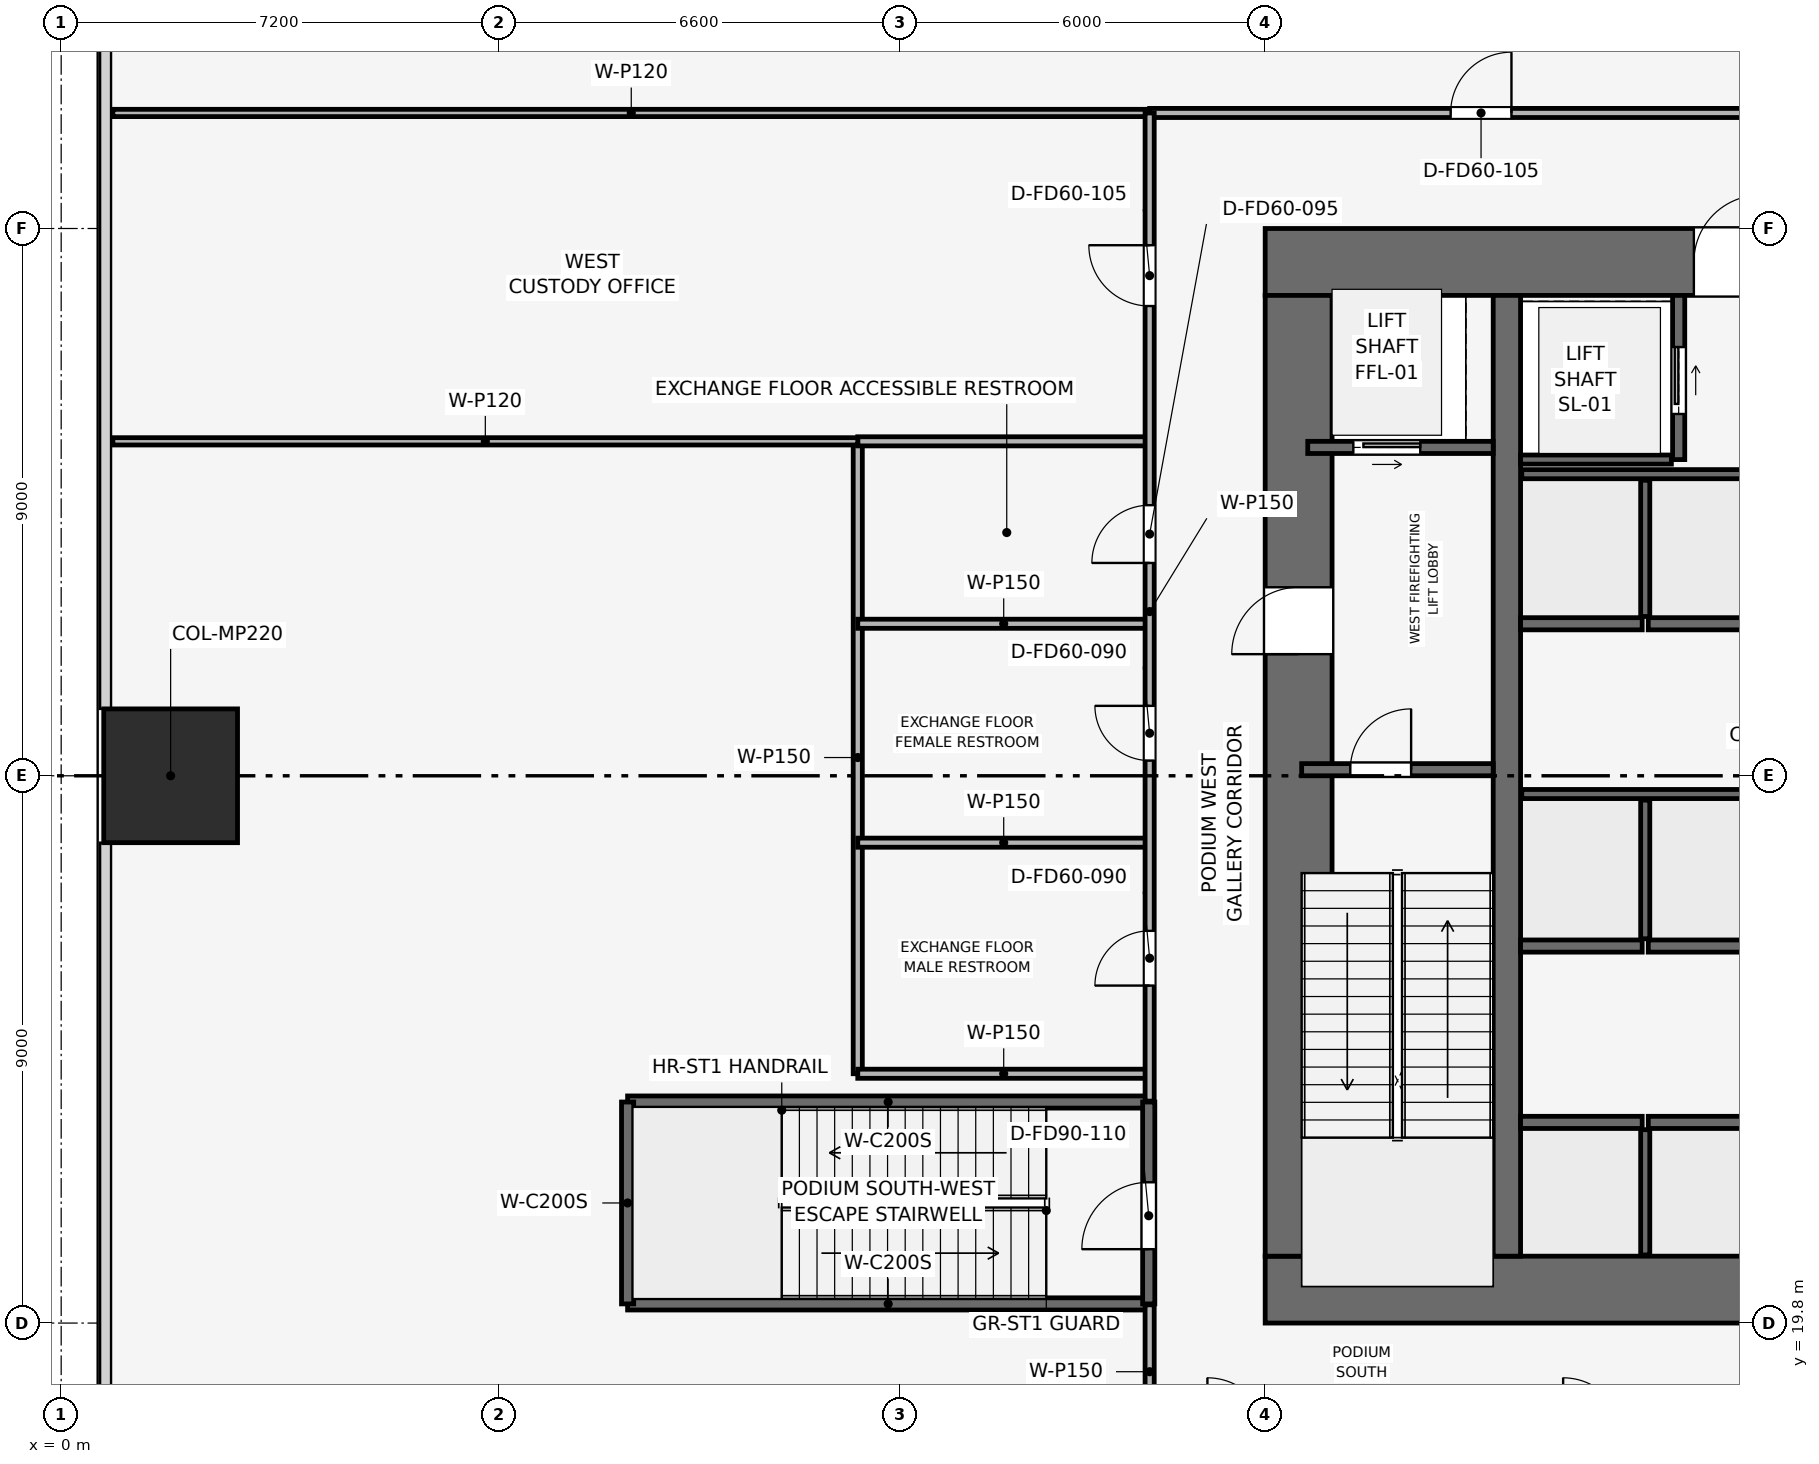
"""IFC4 building model, lengths in metres.
Left out: names, types, materials, properties, quantities, classifications, styles, units other than length and angle.
Written with IfcOpenShell. Run it as: python <this file> out.ifc"""

import sys

from ifc_helpers import new_model, si_unit, direction, frame, frame_2d, origin, origin_2d, place, context, subcontext, project, spatial, rectangle, extrude, element, fill, save


model = new_model("IFC4")
c1 = context("Model", 3, precision=1e-05, world=origin(), true_north=direction((0.0, 1.0)))
c2 = subcontext(c1, "Body", "Model", "MODEL_VIEW")
j1 = project(units=[si_unit("LENGTHUNIT", "METRE"), si_unit("PLANEANGLEUNIT", "RADIAN")], contexts=[c1])
p1 = place(None, origin())
s1 = spatial("IfcSite", under=j1, at=p1, CompositionType="ELEMENT")
p2 = place(p1, origin())
s2 = spatial("IfcBuilding", under=s1, at=p2, CompositionType="ELEMENT")
p3 = place(p2, frame((0.0, 0.0, 13.8)))
s3 = spatial("IfcBuildingStorey", under=s2, at=p3, CompositionType="ELEMENT", Elevation=13.8)
p4 = place(p3, frame((19.8, 20.35, 0.0), z_axis=(0.0, 0.0, 1.0), x_axis=(1.0, 0.0, 0.0)))
e1 = element("IfcWall", 1, at=p4, inside=s3, PredefinedType="SHEAR", context=c2, shape_type="SweptSolid", body=[
    extrude(rectangle(XDim=18.0, YDim=1.1, at=frame_2d((9.0, 0.0))), origin(), (0.0, 0.0, 1.0), 5.4),
])
p5 = place(p4, frame((8.4, 0.0, 0.0)))
e2 = element("IfcOpeningElement", 2, at=p5, cuts=e1, PredefinedType="OPENING", context=c2, shape_type="SweptSolid", body=[
    extrude(rectangle(XDim=1.2, YDim=2.2, at=frame_2d((0.6, 1.1))), frame((0.0, 0.56, 0.0), z_axis=(0.0, -1.0, 0.0), x_axis=(1.0, 0.0, 0.0)), (0.0, 0.0, 1.0), 1.12),
])
p6 = place(p3, frame((19.8, 37.25, 0.0), z_axis=(0.0, 0.0, 1.0), x_axis=(1.0, 0.0, 0.0)))
e3 = element("IfcWall", 3, at=p6, inside=s3, PredefinedType="SHEAR", context=c2, shape_type="SweptSolid", body=[
    extrude(rectangle(XDim=18.0, YDim=1.1, at=frame_2d((9.0, 0.0))), origin(), (0.0, 0.0, 1.0), 5.4),
])
p7 = place(p6, frame((7.05, 0.0, 0.0)))
e4 = element("IfcOpeningElement", 4, at=p7, cuts=e3, PredefinedType="OPENING", context=c2, shape_type="SweptSolid", body=[
    extrude(rectangle(XDim=1.1, YDim=2.15, at=frame_2d((0.55, 1.075))), frame((0.0, 0.56, 0.0), z_axis=(0.0, -1.0, 0.0), x_axis=(1.0, 0.0, 0.0)), (0.0, 0.0, 1.0), 1.12),
])
p8 = place(p3, frame((20.35, 20.9, 0.0), z_axis=(0.0, 0.0, 1.0), x_axis=(0.0, 1.0, 0.0)))
e5 = element("IfcWall", 5, at=p8, inside=s3, PredefinedType="SHEAR", context=c2, shape_type="SweptSolid", body=[
    extrude(rectangle(XDim=15.8, YDim=1.1, at=frame_2d((7.9, 0.0))), origin(), (0.0, 0.0, 1.0), 5.4),
])
p9 = place(p8, frame((9.9, 0.0, 0.0)))
e6 = element("IfcOpeningElement", 6, at=p9, cuts=e5, PredefinedType="OPENING", context=c2, shape_type="SweptSolid", body=[
    extrude(rectangle(XDim=1.1, YDim=2.15, at=frame_2d((0.55, 1.075))), frame((0.0, 0.56, 0.0), z_axis=(0.0, -1.0, 0.0), x_axis=(1.0, 0.0, 0.0)), (0.0, 0.0, 1.0), 1.12),
])
p10 = place(p3, frame((23.775, 20.9, 0.0), z_axis=(0.0, 0.0, 1.0), x_axis=(0.0, 1.0, 0.0)))
e7 = element("IfcWall", 7, at=p10, inside=s3, PredefinedType="SHEAR", context=c2, shape_type="SweptSolid", body=[
    extrude(rectangle(XDim=15.8, YDim=0.45, at=frame_2d((7.9, 0.0))), origin(), (0.0, 0.0, 1.0), 5.4),
])
p11 = place(p3, frame((1.8, 28.8, 0.002), z_axis=(0.0, 0.0, 1.0), x_axis=(1.0, 0.0, 0.0)))
e8 = element("IfcColumn", 8, at=p11, inside=s3, PredefinedType="PILASTER", context=c2, shape_type="SweptSolid", body=[
    extrude(rectangle(XDim=2.2, YDim=2.2, at=origin_2d()), origin(), (0.0, 0.0, 1.0), 5.396),
])
p12 = place(p3, frame((20.4, 28.9, 0.0), z_axis=(0.0, 0.0, 1.0), x_axis=(1.0, 0.0, 0.0)))
e9 = element("IfcWall", 9, at=p12, inside=s3, PredefinedType="SHEAR", context=c2, shape_type="SweptSolid", body=[
    extrude(rectangle(XDim=3.15, YDim=0.2, at=frame_2d((1.575, 0.0))), origin(), (0.0, 0.0, 1.0), 5.05),
])
p13 = place(p12, frame((0.8, 0.0, 0.0)))
e10 = element("IfcOpeningElement", 10, at=p13, cuts=e9, PredefinedType="OPENING", context=c2, shape_type="SweptSolid", body=[
    extrude(rectangle(XDim=1.0, YDim=2.1, at=frame_2d((0.5, 1.05))), frame((0.0, 0.11, 0.0), z_axis=(0.0, -1.0, 0.0), x_axis=(1.0, 0.0, 0.0)), (0.0, 0.0, 1.0), 0.22),
])
p14 = place(p3, frame((20.5, 34.2, 0.0), z_axis=(0.0, 0.0, 1.0), x_axis=(1.0, 0.0, 0.0)))
e11 = element("IfcWall", 11, at=p14, inside=s3, PredefinedType="SHEAR", context=c2, shape_type="SweptSolid", body=[
    extrude(rectangle(XDim=3.05, YDim=0.2, at=frame_2d((1.525, 0.0))), origin(), (0.0, 0.0, 1.0), 5.05),
])
p15 = place(p14, frame((0.75, 0.0, 0.0)))
e12 = element("IfcOpeningElement", 12, at=p15, cuts=e11, PredefinedType="OPENING", context=c2, shape_type="SweptSolid", body=[
    extrude(rectangle(XDim=1.1, YDim=2.15, at=frame_2d((0.55, 1.075))), frame((0.0, 0.11, 0.0), z_axis=(0.0, -1.0, 0.0), x_axis=(1.0, 0.0, 0.0)), (0.0, 0.0, 1.0), 0.22),
])
p16 = place(p3, frame((26.6, 34.0, 0.0), z_axis=(0.0, 0.0, 1.0), x_axis=(0.0, 1.0, 0.0)))
e13 = element("IfcWall", 13, at=p16, inside=s3, PredefinedType="SHEAR", context=c2, shape_type="SweptSolid", body=[
    extrude(rectangle(XDim=2.7, YDim=0.2, at=frame_2d((1.35, 0.0))), origin(), (0.0, 0.0, 1.0), 5.05),
])
p17 = place(p16, frame((0.75, 0.0, 0.0)))
e14 = element("IfcOpeningElement", 14, at=p17, cuts=e13, PredefinedType="OPENING", context=c2, shape_type="SweptSolid", body=[
    extrude(rectangle(XDim=1.1, YDim=2.15, at=frame_2d((0.55, 1.075))), frame((0.0, 0.11, 0.0), z_axis=(0.0, -1.0, 0.0), x_axis=(1.0, 0.0, 0.0)), (0.0, 0.0, 1.0), 0.22),
])
p18 = place(p3, frame((24.0, 34.0, 0.0), z_axis=(0.0, 0.0, 1.0), x_axis=(1.0, 0.0, 0.0)))
e15 = element("IfcWall", 15, at=p18, inside=s3, PredefinedType="SHEAR", context=c2, shape_type="SweptSolid", body=[
    extrude(rectangle(XDim=2.48, YDim=0.15, at=frame_2d((1.24, 0.0))), origin(), (0.0, 0.0, 1.0), 5.05),
])
for number, where, z_axis, x_axis in (
    (16, (24.0, 23.1, 0.0), (0.0, 0.0, 1.0), (1.0, 0.0, 0.0)),
    (17, (26.1, 23.1, 0.0), (0.0, 0.0, 1.0), (1.0, 0.0, 0.0)),
    (18, (24.0, 26.0, 0.0), (0.0, 0.0, 1.0), (1.0, 0.0, 0.0)),
    (19, (26.1, 26.0, 0.0), (0.0, 0.0, 1.0), (1.0, 0.0, 0.0)),
    (20, (24.0, 31.3, 0.0), (0.0, 0.0, 1.0), (1.0, 0.0, 0.0)),
    (21, (26.1, 31.3, 0.0), (0.0, 0.0, 1.0), (1.0, 0.0, 0.0)),
):
    element("IfcWall", number, at=place(p3, frame(where, z_axis=z_axis, x_axis=x_axis)), inside=s3, PredefinedType="SHEAR", context=c2, shape_type="SweptSolid", body=[
        extrude(rectangle(XDim=2.0, YDim=0.2, at=frame_2d((1.0, 0.0))), origin(), (0.0, 0.0, 1.0), 5.05),
    ])
p19 = place(p3, frame((26.05, 20.92, 0.0), z_axis=(0.0, 0.0, 1.0), x_axis=(0.0, 1.0, 0.0)))
e22 = element("IfcWall", 22, at=p19, inside=s3, PredefinedType="SHEAR", context=c2, shape_type="SweptSolid", body=[
    extrude(rectangle(XDim=2.06, YDim=0.15, at=frame_2d((1.03, 0.0))), origin(), (0.0, 0.0, 1.0), 5.05),
])
p20 = place(p3, frame((24.02, 28.5, 0.0), z_axis=(0.0, 0.0, 1.0), x_axis=(1.0, 0.0, 0.0)))
e23 = element("IfcWall", 23, at=p20, inside=s3, PredefinedType="SHEAR", context=c2, shape_type="SweptSolid", body=[
    extrude(rectangle(XDim=4.08, YDim=0.15, at=frame_2d((2.04, 0.0))), origin(), (0.0, 0.0, 1.0), 5.05),
])
p21 = place(p3, frame((26.05, 26.12, 0.0), z_axis=(0.0, 0.0, 1.0), x_axis=(0.0, 1.0, 0.0)))
e24 = element("IfcWall", 24, at=p21, inside=s3, PredefinedType="SHEAR", context=c2, shape_type="SweptSolid", body=[
    extrude(rectangle(XDim=2.28, YDim=0.15, at=frame_2d((1.14, 0.0))), origin(), (0.0, 0.0, 1.0), 5.05),
])
p22 = place(p3, frame((24.02, 33.76, 0.0), z_axis=(0.0, 0.0, 1.0), x_axis=(1.0, 0.0, 0.0)))
e25 = element("IfcWall", 25, at=p22, inside=s3, PredefinedType="SHEAR", context=c2, shape_type="SweptSolid", body=[
    extrude(rectangle(XDim=4.08, YDim=0.15, at=frame_2d((2.04, 0.0))), origin(), (0.0, 0.0, 1.0), 5.05),
])
p23 = place(p3, frame((26.05, 31.42, 0.0), z_axis=(0.0, 0.0, 1.0), x_axis=(0.0, 1.0, 0.0)))
e26 = element("IfcWall", 26, at=p23, inside=s3, PredefinedType="SHEAR", context=c2, shape_type="SweptSolid", body=[
    extrude(rectangle(XDim=2.24, YDim=0.15, at=frame_2d((1.12, 0.0))), origin(), (0.0, 0.0, 1.0), 5.05),
])
for number, where, z_axis, x_axis in (
    (27, (9.315, 20.115, 0.0), (0.0, 0.0, 1.0), (1.0, 0.0, 0.0)),
    (28, (9.315, 23.435, 0.0), (0.0, 0.0, 1.0), (1.0, 0.0, 0.0)),
):
    element("IfcWall", number, at=place(p3, frame(where, z_axis=z_axis, x_axis=x_axis)), inside=s3, PredefinedType="SHEAR", context=c2, shape_type="SweptSolid", body=[
        extrude(rectangle(XDim=8.57, YDim=0.2, at=frame_2d((4.285, 0.0))), origin(), (0.0, 0.0, 1.0), 5.398),
    ])
p24 = place(p3, frame((9.315, 20.115, 0.0), z_axis=(0.0, 0.0, 1.0), x_axis=(0.0, 1.0, 0.0)))
e29 = element("IfcWall", 29, at=p24, inside=s3, PredefinedType="SHEAR", context=c2, shape_type="SweptSolid", body=[
    extrude(rectangle(XDim=3.32, YDim=0.2, at=frame_2d((1.66, 0.0))), origin(), (0.0, 0.0, 1.0), 5.398),
])
p25 = place(p3, frame((17.885, 20.115, 0.0), z_axis=(0.0, 0.0, 1.0), x_axis=(0.0, 1.0, 0.0)))
e30 = element("IfcWall", 30, at=p25, inside=s3, PredefinedType="SHEAR", context=c2, shape_type="SweptSolid", body=[
    extrude(rectangle(XDim=3.32, YDim=0.2, at=frame_2d((1.66, 0.0))), origin(), (0.0, 0.0, 1.0), 5.398),
])
p26 = place(p25, frame((0.9, 0.0, 0.0)))
e31 = element("IfcOpeningElement", 31, at=p26, cuts=e30, PredefinedType="OPENING", context=c2, shape_type="SweptSolid", body=[
    extrude(rectangle(XDim=1.1, YDim=2.15, at=frame_2d((0.55, 1.075))), frame((0.0, 0.11, 0.0), z_axis=(0.0, -1.0, 0.0), x_axis=(1.0, 0.0, 0.0)), (0.0, 0.0, 1.0), 0.22),
])
p27 = place(p3, frame((13.1, 23.9, 0.0), z_axis=(0.0, 0.0, 1.0), x_axis=(0.0, 1.0, 0.0)))
e32 = element("IfcWall", 32, at=p27, inside=s3, PredefinedType="PARTITIONING", context=c2, shape_type="SweptSolid", body=[
    extrude(rectangle(XDim=10.4, YDim=0.15, at=frame_2d((5.2, 0.0))), origin(), (0.0, 0.0, 1.0), 4.135),
])
for number, where, z_axis, x_axis in (
    (33, (13.1, 23.9, 0.0), (0.0, 0.0, 1.0), (1.0, 0.0, 0.0)),
    (34, (13.1, 34.3, 0.0), (0.0, 0.0, 1.0), (1.0, 0.0, 0.0)),
    (35, (13.1, 27.7, 0.0), (0.0, 0.0, 1.0), (1.0, 0.0, 0.0)),
    (36, (13.1, 31.3, 0.0), (0.0, 0.0, 1.0), (1.0, 0.0, 0.0)),
):
    element("IfcWall", number, at=place(p3, frame(where, z_axis=z_axis, x_axis=x_axis)), inside=s3, PredefinedType="PARTITIONING", context=c2, shape_type="SweptSolid", body=[
        extrude(rectangle(XDim=4.8, YDim=0.15, at=frame_2d((2.4, 0.0))), origin(), (0.0, 0.0, 1.0), 5.05),
    ])
p28 = place(p3, frame((0.85, 34.3, 0.0), z_axis=(0.0, 0.0, 1.0), x_axis=(1.0, 0.0, 0.0)))
e37 = element("IfcWall", 37, at=p28, inside=s3, PredefinedType="PARTITIONING", context=c2, shape_type="SweptSolid", body=[
    extrude(rectangle(XDim=12.25, YDim=0.12, at=frame_2d((6.125, 0.0))), origin(), (0.0, 0.0, 1.0), 4.035),
])
p29 = place(p3, frame((0.85, 39.7, 0.0), z_axis=(0.0, 0.0, 1.0), x_axis=(1.0, 0.0, 0.0)))
e38 = element("IfcWall", 38, at=p29, inside=s3, PredefinedType="PARTITIONING", context=c2, shape_type="SweptSolid", body=[
    extrude(rectangle(XDim=17.05, YDim=0.12, at=frame_2d((8.525, 0.0))), origin(), (0.0, 0.0, 1.0), 4.035),
])
p30 = place(p3, frame((17.9, 39.7, 0.0), z_axis=(0.0, 0.0, 1.0), x_axis=(1.0, 0.0, 0.0)))
e39 = element("IfcWall", 39, at=p30, inside=s3, PredefinedType="PARTITIONING", context=c2, shape_type="SweptSolid", body=[
    extrude(rectangle(XDim=21.8, YDim=0.15, at=frame_2d((10.9, 0.0))), origin(), (0.0, 0.0, 1.0), 4.135),
])
p31 = place(p30, frame((4.95, 0.0, 0.0)))
e40 = element("IfcOpeningElement", 40, at=p31, cuts=e39, PredefinedType="OPENING", context=c2, shape_type="SweptSolid", body=[
    extrude(rectangle(XDim=1.0, YDim=2.15, at=frame_2d((0.5, 1.075))), frame((0.0, 0.085, 0.0), z_axis=(0.0, -1.0, 0.0), x_axis=(1.0, 0.0, 0.0)), (0.0, 0.0, 1.0), 0.17),
])
p32 = place(p30, frame((15.85, 0.0, 0.0)))
e41 = element("IfcOpeningElement", 41, at=p32, cuts=e39, PredefinedType="OPENING", context=c2, shape_type="SweptSolid", body=[
    extrude(rectangle(XDim=1.0, YDim=2.15, at=frame_2d((0.5, 1.075))), frame((0.0, 0.085, 0.0), z_axis=(0.0, -1.0, 0.0), x_axis=(1.0, 0.0, 0.0)), (0.0, 0.0, 1.0), 0.17),
])
p33 = place(p3, frame((17.9, 17.9, 0.0), z_axis=(0.0, 0.0, 1.0), x_axis=(0.0, 1.0, 0.0)))
e42 = element("IfcWall", 42, at=p33, inside=s3, PredefinedType="PARTITIONING", context=c2, shape_type="SweptSolid", body=[
    extrude(rectangle(XDim=2.2, YDim=0.15, at=frame_2d((1.1, 0.0))), origin(), (0.0, 0.0, 1.0), 5.05),
])
p34 = place(p3, frame((17.9, 23.45, 0.0), z_axis=(0.0, 0.0, 1.0), x_axis=(0.0, 1.0, 0.0)))
e43 = element("IfcWall", 43, at=p34, inside=s3, PredefinedType="PARTITIONING", context=c2, shape_type="SweptSolid", body=[
    extrude(rectangle(XDim=16.25, YDim=0.15, at=frame_2d((8.125, 0.0))), origin(), (0.0, 0.0, 1.0), 4.135),
])
p35 = place(p34, frame((1.9, 0.0, 0.0)))
e44 = element("IfcOpeningElement", 44, at=p35, cuts=e43, PredefinedType="OPENING", context=c2, shape_type="SweptSolid", body=[
    extrude(rectangle(XDim=0.9, YDim=2.1, at=frame_2d((0.45, 1.05))), frame((0.0, 0.085, 0.0), z_axis=(0.0, -1.0, 0.0), x_axis=(1.0, 0.0, 0.0)), (0.0, 0.0, 1.0), 0.17),
])
p36 = place(p34, frame((5.6, 0.0, 0.0)))
e45 = element("IfcOpeningElement", 45, at=p36, cuts=e43, PredefinedType="OPENING", context=c2, shape_type="SweptSolid", body=[
    extrude(rectangle(XDim=0.9, YDim=2.1, at=frame_2d((0.45, 1.05))), frame((0.0, 0.085, 0.0), z_axis=(0.0, -1.0, 0.0), x_axis=(1.0, 0.0, 0.0)), (0.0, 0.0, 1.0), 0.17),
])
p37 = place(p34, frame((8.85, 0.0, 0.0)))
e46 = element("IfcOpeningElement", 46, at=p37, cuts=e43, PredefinedType="OPENING", context=c2, shape_type="SweptSolid", body=[
    extrude(rectangle(XDim=0.95, YDim=2.1, at=frame_2d((0.475, 1.05))), frame((0.0, 0.085, 0.0), z_axis=(0.0, -1.0, 0.0), x_axis=(1.0, 0.0, 0.0)), (0.0, 0.0, 1.0), 0.17),
])
p38 = place(p34, frame((13.075, 0.0, 0.0)))
e47 = element("IfcOpeningElement", 47, at=p38, cuts=e43, PredefinedType="OPENING", context=c2, shape_type="SweptSolid", body=[
    extrude(rectangle(XDim=1.0, YDim=2.15, at=frame_2d((0.5, 1.075))), frame((0.0, 0.085, 0.0), z_axis=(0.0, -1.0, 0.0), x_axis=(1.0, 0.0, 0.0)), (0.0, 0.0, 1.0), 0.17),
])
p39 = place(p13, origin())
e48 = element("IfcDoor", 48, at=p39, inside=s3, OperationType="SINGLE_SWING_RIGHT", PredefinedType="DOOR", context=c2, shape_type="SweptSolid", body=[
    extrude(rectangle(XDim=1.0, YDim=2.1, at=frame_2d((0.5, 1.05))), frame((0.0, 0.025, 0.0), z_axis=(0.0, -1.0, 0.0), x_axis=(1.0, 0.0, 0.0)), (0.0, 0.0, 1.0), 0.05),
])
fill(e10, e48)
p40 = place(p15, origin())
e49 = element("IfcDoor", 49, at=p40, inside=s3, OperationType="SLIDING_TO_RIGHT", PredefinedType="DOOR", context=c2, shape_type="SweptSolid", body=[
    extrude(rectangle(XDim=1.1, YDim=2.15, at=frame_2d((0.55, 1.075))), frame((0.0, 0.025, 0.0), z_axis=(0.0, -1.0, 0.0), x_axis=(1.0, 0.0, 0.0)), (0.0, 0.0, 1.0), 0.05),
])
fill(e12, e49)
p41 = place(p17, origin())
e50 = element("IfcDoor", 50, at=p41, inside=s3, OperationType="SLIDING_TO_RIGHT", PredefinedType="DOOR", context=c2, shape_type="SweptSolid", body=[
    extrude(rectangle(XDim=1.1, YDim=2.15, at=frame_2d((0.55, 1.075))), frame((0.0, 0.025, 0.0), z_axis=(0.0, -1.0, 0.0), x_axis=(1.0, 0.0, 0.0)), (0.0, 0.0, 1.0), 0.05),
])
fill(e14, e50)
p42 = place(p26, origin())
e51 = element("IfcDoor", 51, at=p42, inside=s3, OperationType="SINGLE_SWING_LEFT", PredefinedType="DOOR", context=c2, shape_type="SweptSolid", body=[
    extrude(rectangle(XDim=1.1, YDim=2.15, at=frame_2d((0.55, 1.075))), frame((0.0, 0.025, 0.0), z_axis=(0.0, -1.0, 0.0), x_axis=(1.0, 0.0, 0.0)), (0.0, 0.0, 1.0), 0.05),
])
fill(e31, e51)
p43 = place(p31, origin())
e52 = element("IfcDoor", 52, at=p43, inside=s3, OperationType="SINGLE_SWING_RIGHT", PredefinedType="DOOR", context=c2, shape_type="SweptSolid", body=[
    extrude(rectangle(XDim=1.0, YDim=2.15, at=frame_2d((0.5, 1.075))), frame((0.0, 0.025, 0.0), z_axis=(0.0, -1.0, 0.0), x_axis=(1.0, 0.0, 0.0)), (0.0, 0.0, 1.0), 0.05),
])
fill(e40, e52)
p44 = place(p35, origin())
e53 = element("IfcDoor", 53, at=p44, inside=s3, OperationType="SINGLE_SWING_LEFT", PredefinedType="DOOR", context=c2, shape_type="SweptSolid", body=[
    extrude(rectangle(XDim=0.9, YDim=2.1, at=frame_2d((0.45, 1.05))), frame((0.0, 0.025, 0.0), z_axis=(0.0, -1.0, 0.0), x_axis=(1.0, 0.0, 0.0)), (0.0, 0.0, 1.0), 0.05),
])
fill(e44, e53)
p45 = place(p36, origin())
e54 = element("IfcDoor", 54, at=p45, inside=s3, OperationType="SINGLE_SWING_RIGHT", PredefinedType="DOOR", context=c2, shape_type="SweptSolid", body=[
    extrude(rectangle(XDim=0.9, YDim=2.1, at=frame_2d((0.45, 1.05))), frame((0.0, 0.025, 0.0), z_axis=(0.0, -1.0, 0.0), x_axis=(1.0, 0.0, 0.0)), (0.0, 0.0, 1.0), 0.05),
])
fill(e45, e54)
p46 = place(p37, origin())
e55 = element("IfcDoor", 55, at=p46, inside=s3, OperationType="SINGLE_SWING_LEFT", PredefinedType="DOOR", context=c2, shape_type="SweptSolid", body=[
    extrude(rectangle(XDim=0.95, YDim=2.1, at=frame_2d((0.475, 1.05))), frame((0.0, 0.025, 0.0), z_axis=(0.0, -1.0, 0.0), x_axis=(1.0, 0.0, 0.0)), (0.0, 0.0, 1.0), 0.05),
])
fill(e46, e55)
p47 = place(p38, origin())
e56 = element("IfcDoor", 56, at=p47, inside=s3, OperationType="SINGLE_SWING_RIGHT", PredefinedType="DOOR", context=c2, shape_type="SweptSolid", body=[
    extrude(rectangle(XDim=1.0, YDim=2.15, at=frame_2d((0.5, 1.075))), frame((0.0, 0.025, 0.0), z_axis=(0.0, -1.0, 0.0), x_axis=(1.0, 0.0, 0.0)), (0.0, 0.0, 1.0), 0.05),
])
fill(e47, e56)
p48 = place(p9, origin())
e57 = element("IfcDoor", 57, at=p48, inside=s3, OperationType="SINGLE_SWING_LEFT", PredefinedType="DOOR", context=c2, shape_type="SweptSolid", body=[
    extrude(rectangle(XDim=1.1, YDim=2.15, at=frame_2d((0.55, 1.075))), frame((0.0, 0.025, 0.0), z_axis=(0.0, -1.0, 0.0), x_axis=(1.0, 0.0, 0.0)), (0.0, 0.0, 1.0), 0.05),
])
fill(e6, e57)
p49 = place(p7, origin())
e58 = element("IfcDoor", 58, at=p49, inside=s3, OperationType="SINGLE_SWING_RIGHT", PredefinedType="DOOR", context=c2, shape_type="SweptSolid", body=[
    extrude(rectangle(XDim=1.1, YDim=2.15, at=frame_2d((0.55, 1.075))), frame((0.0, 0.025, 0.0), z_axis=(0.0, -1.0, 0.0), x_axis=(1.0, 0.0, 0.0)), (0.0, 0.0, 1.0), 0.05),
])
fill(e4, e58)
save(model, sys.argv[1])
